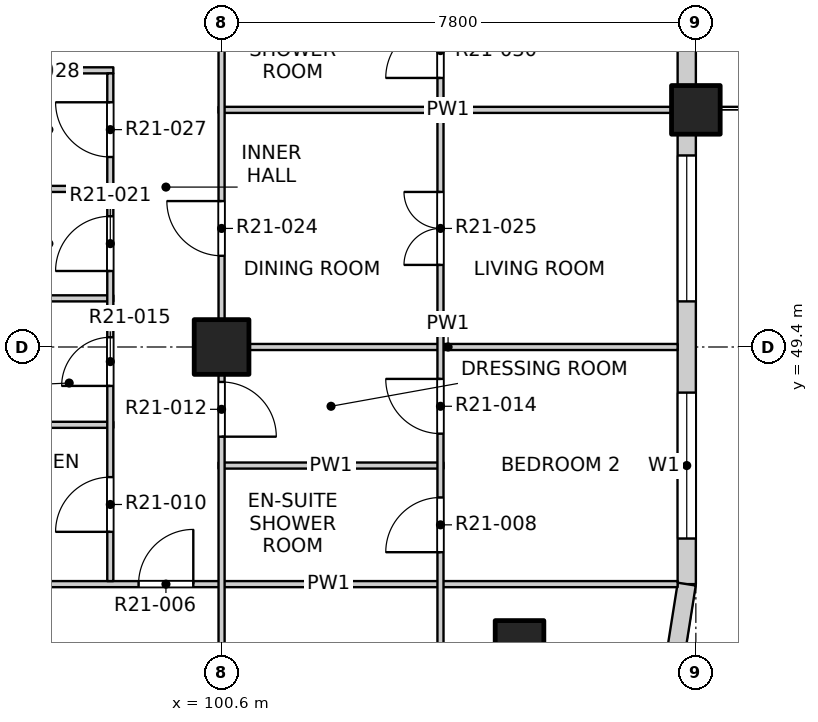
"""IFC4 building model, lengths in metres.
Left out: names, types, materials, properties, quantities, classifications, styles, units other than length and angle.
Written with IfcOpenShell. Run it as: python <this file> out.ifc"""

import sys

from ifc_helpers import new_model, si_unit, direction, frame, frame_2d, origin, origin_2d, place, context, subcontext, project, spatial, rectangle, extrude, element, fill, save


model = new_model("IFC4")
c1 = context("Model", 3, precision=1e-05, world=origin(), true_north=direction((0.0, 1.0)))
c2 = subcontext(c1, "Body", "Model", "MODEL_VIEW")
j1 = project(units=[si_unit("LENGTHUNIT", "METRE"), si_unit("PLANEANGLEUNIT", "RADIAN")], contexts=[c1])
p1 = place(None, origin())
s1 = spatial("IfcSite", under=j1, at=p1, CompositionType="ELEMENT")
p2 = place(p1, origin())
s2 = spatial("IfcBuilding", under=s1, at=p2, CompositionType="ELEMENT")
p3 = place(p2, frame((0.0, 0.0, 214.3)))
s3 = spatial("IfcBuildingStorey", under=s2, at=p3, CompositionType="ELEMENT", Elevation=214.3)
for number, where, z_axis, x_axis in (
    (1, (105.5, 44.5, -0.25), (0.0, 0.0, 1.0), (1.0, 0.0, 0.0)),
    (2, (108.4, 53.3, -0.25), (0.0, 0.0, 1.0), (1.0, 0.0, 0.0)),
):
    element("IfcColumn", number, at=place(p3, frame(where, z_axis=z_axis, x_axis=x_axis)), inside=s3, PredefinedType="COLUMN", context=c2, shape_type="SweptSolid", body=[
        extrude(rectangle(XDim=0.8, YDim=0.8, at=origin_2d()), origin(), (0.0, 0.0, 1.0), 3.4),
    ])
p4 = place(p3, frame((100.6, 49.4, -0.25), z_axis=(0.0, 0.0, 1.0), x_axis=(1.0, 0.0, 0.0)))
e3 = element("IfcColumn", 3, at=p4, inside=s3, PredefinedType="COLUMN", context=c2, shape_type="SweptSolid", body=[
    extrude(rectangle(XDim=0.9, YDim=0.9, at=origin_2d()), origin(), (0.0, 0.0, 1.0), 3.4),
])
p5 = place(p3, frame((108.25, 45.5, 0.0), z_axis=(0.0, 0.0, 1.0), x_axis=(0.0, 1.0, 0.0)))
e4 = element("IfcWall", 4, at=p5, inside=s3, PredefinedType="SOLIDWALL", context=c2, shape_type="SweptSolid", body=[
    extrude(rectangle(XDim=7.4, YDim=0.3, at=frame_2d((3.7, 0.0))), origin(), (0.0, 0.0, 1.0), 2.7),
])
p6 = place(p5, frame((0.75, 0.0, 0.9)))
e5 = element("IfcOpeningElement", 5, at=p6, cuts=e4, PredefinedType="OPENING", context=c2, shape_type="SweptSolid", body=[
    extrude(rectangle(XDim=2.4, YDim=1.8, at=frame_2d((1.2, 0.9))), frame((0.0, 0.16, 0.0), z_axis=(0.0, -1.0, 0.0), x_axis=(1.0, 0.0, 0.0)), (0.0, 0.0, 1.0), 0.32),
])
p7 = place(p5, frame((4.65, 0.0, 0.9)))
e6 = element("IfcOpeningElement", 6, at=p7, cuts=e4, PredefinedType="OPENING", context=c2, shape_type="SweptSolid", body=[
    extrude(rectangle(XDim=2.4, YDim=1.8, at=frame_2d((1.2, 0.9))), frame((0.0, 0.16, 0.0), z_axis=(0.0, -1.0, 0.0), x_axis=(1.0, 0.0, 0.0)), (0.0, 0.0, 1.0), 0.32),
])
p8 = place(p3, frame((108.25, 53.7, 0.0), z_axis=(0.0, 0.0, 1.0), x_axis=(0.0, 1.0, 0.0)))
e7 = element("IfcWall", 7, at=p8, inside=s3, PredefinedType="SOLIDWALL", context=c2, shape_type="SweptSolid", body=[
    extrude(rectangle(XDim=7.0, YDim=0.3, at=frame_2d((3.5, 0.0))), origin(), (0.0, 0.0, 1.0), 2.7),
])
p9 = place(p8, frame((0.65, 0.0, 0.0)))
e8 = element("IfcOpeningElement", 8, at=p9, cuts=e7, PredefinedType="OPENING", context=c2, shape_type="SweptSolid", body=[
    extrude(rectangle(XDim=1.8, YDim=2.4, at=frame_2d((0.9, 1.2))), frame((0.0, 0.16, 0.0), z_axis=(0.0, -1.0, 0.0), x_axis=(1.0, 0.0, 0.0)), (0.0, 0.0, 1.0), 0.32),
])
p10 = place(p8, frame((4.25, 0.0, 0.9)))
e9 = element("IfcOpeningElement", 9, at=p10, cuts=e7, PredefinedType="OPENING", context=c2, shape_type="SweptSolid", body=[
    extrude(rectangle(XDim=2.4, YDim=1.8, at=frame_2d((1.2, 0.9))), frame((0.0, 0.16, 0.0), z_axis=(0.0, -1.0, 0.0), x_axis=(1.0, 0.0, 0.0)), (0.0, 0.0, 1.0), 0.32),
])
p11 = place(p3, frame((108.066, 44.341, 0.0), z_axis=(0.0, 0.0, 1.0), x_axis=(0.156496880861, 0.987678452879, 0.0)))
e10 = element("IfcWall", 10, at=p11, inside=s3, PredefinedType="SOLIDWALL", context=c2, shape_type="SweptSolid", body=[
    extrude(rectangle(XDim=1.173, YDim=0.3, at=frame_2d((0.586, 0.0))), origin(), (0.0, 0.0, 1.0), 2.7),
])
p12 = place(p3, frame((96.625, 45.5, 0.0), z_axis=(0.0, 0.0, 1.0), x_axis=(1.0, 0.0, 0.0)))
e11 = element("IfcWall", 11, at=p12, inside=s3, PredefinedType="PARTITIONING", context=c2, shape_type="SweptSolid", body=[
    extrude(rectangle(XDim=11.475, YDim=0.1, at=frame_2d((5.738, 0.0))), origin(), (0.0, 0.0, 1.0), 3.15),
])
p13 = place(p12, frame((2.61, 0.0, 0.0)))
e12 = element("IfcOpeningElement", 12, at=p13, cuts=e11, PredefinedType="OPENING", context=c2, shape_type="SweptSolid", body=[
    extrude(rectangle(XDim=0.9, YDim=2.1, at=frame_2d((0.45, 1.05))), frame((0.0, 0.06, 0.0), z_axis=(0.0, -1.0, 0.0), x_axis=(1.0, 0.0, 0.0)), (0.0, 0.0, 1.0), 0.12),
])
p14 = place(p3, frame((100.55, 47.45, 0.0), z_axis=(0.0, 0.0, 1.0), x_axis=(1.0, 0.0, 0.0)))
e13 = element("IfcWall", 13, at=p14, inside=s3, PredefinedType="PARTITIONING", context=c2, shape_type="SweptSolid", body=[
    extrude(rectangle(XDim=3.7, YDim=0.1, at=frame_2d((1.85, 0.0))), origin(), (0.0, 0.0, 1.0), 3.15),
])
p15 = place(p3, frame((96.625, 48.12, 0.0), z_axis=(0.0, 0.0, 1.0), x_axis=(1.0, 0.0, 0.0)))
e14 = element("IfcWall", 14, at=p15, inside=s3, PredefinedType="PARTITIONING", context=c2, shape_type="SweptSolid", body=[
    extrude(rectangle(XDim=2.195, YDim=0.1, at=frame_2d((1.098, 0.0))), origin(), (0.0, 0.0, 1.0), 3.15),
])
p16 = place(p3, frame((100.55, 49.4, 0.0), z_axis=(0.0, 0.0, 1.0), x_axis=(1.0, 0.0, 0.0)))
e15 = element("IfcWall", 15, at=p16, inside=s3, PredefinedType="PARTITIONING", context=c2, shape_type="SweptSolid", body=[
    extrude(rectangle(XDim=7.55, YDim=0.1, at=frame_2d((3.775, 0.0))), origin(), (0.0, 0.0, 1.0), 3.15),
])
for number, where, z_axis, x_axis in (
    (16, (96.6, 50.2, 0.0), (0.0, 0.0, 1.0), (1.0, 0.0, 0.0)),
    (17, (96.6, 52.0, 0.0), (0.0, 0.0, 1.0), (1.0, 0.0, 0.0)),
):
    element("IfcWall", number, at=place(p3, frame(where, z_axis=z_axis, x_axis=x_axis)), inside=s3, PredefinedType="PARTITIONING", context=c2, shape_type="SweptSolid", body=[
        extrude(rectangle(XDim=2.22, YDim=0.1, at=frame_2d((1.11, 0.0))), origin(), (0.0, 0.0, 1.0), 3.15),
    ])
p17 = place(p3, frame((100.55, 53.3, 0.0), z_axis=(0.0, 0.0, 1.0), x_axis=(1.0, 0.0, 0.0)))
e18 = element("IfcWall", 18, at=p17, inside=s3, PredefinedType="PARTITIONING", context=c2, shape_type="SweptSolid", body=[
    extrude(rectangle(XDim=7.55, YDim=0.1, at=frame_2d((3.775, 0.0))), origin(), (0.0, 0.0, 1.0), 3.15),
])
p18 = place(p3, frame((96.6, 53.95, 0.0), z_axis=(0.0, 0.0, 1.0), x_axis=(1.0, 0.0, 0.0)))
e19 = element("IfcWall", 19, at=p18, inside=s3, PredefinedType="PARTITIONING", context=c2, shape_type="SweptSolid", body=[
    extrude(rectangle(XDim=2.22, YDim=0.1, at=frame_2d((1.11, 0.0))), origin(), (0.0, 0.0, 1.0), 3.15),
])
p19 = place(p3, frame((98.77, 45.55, 0.0), z_axis=(0.0, 0.0, 1.0), x_axis=(0.0, 1.0, 0.0)))
e20 = element("IfcWall", 20, at=p19, inside=s3, PredefinedType="PARTITIONING", context=c2, shape_type="SweptSolid", body=[
    extrude(rectangle(XDim=8.35, YDim=0.1, at=frame_2d((4.175, 0.0))), origin(), (0.0, 0.0, 1.0), 3.15),
])
p20 = place(p19, frame((0.81, 0.0, 0.0)))
e21 = element("IfcOpeningElement", 21, at=p20, cuts=e20, PredefinedType="OPENING", context=c2, shape_type="SweptSolid", body=[
    extrude(rectangle(XDim=0.9, YDim=2.1, at=frame_2d((0.45, 1.05))), frame((0.0, 0.06, 0.0), z_axis=(0.0, -1.0, 0.0), x_axis=(1.0, 0.0, 0.0)), (0.0, 0.0, 1.0), 0.12),
])
p21 = place(p19, frame((3.21, 0.0, 0.0)))
e22 = element("IfcOpeningElement", 22, at=p21, cuts=e20, PredefinedType="OPENING", context=c2, shape_type="SweptSolid", body=[
    extrude(rectangle(XDim=0.8, YDim=2.1, at=frame_2d((0.4, 1.05))), frame((0.0, 0.06, 0.0), z_axis=(0.0, -1.0, 0.0), x_axis=(1.0, 0.0, 0.0)), (0.0, 0.0, 1.0), 0.12),
])
p22 = place(p19, frame((5.1, 0.0, 0.0)))
e23 = element("IfcOpeningElement", 23, at=p22, cuts=e20, PredefinedType="OPENING", context=c2, shape_type="SweptSolid", body=[
    extrude(rectangle(XDim=0.9, YDim=2.1, at=frame_2d((0.45, 1.05))), frame((0.0, 0.06, 0.0), z_axis=(0.0, -1.0, 0.0), x_axis=(1.0, 0.0, 0.0)), (0.0, 0.0, 1.0), 0.12),
])
p23 = place(p19, frame((6.975, 0.0, 0.0)))
e24 = element("IfcOpeningElement", 24, at=p23, cuts=e20, PredefinedType="OPENING", context=c2, shape_type="SweptSolid", body=[
    extrude(rectangle(XDim=0.9, YDim=2.1, at=frame_2d((0.45, 1.05))), frame((0.0, 0.06, 0.0), z_axis=(0.0, -1.0, 0.0), x_axis=(1.0, 0.0, 0.0)), (0.0, 0.0, 1.0), 0.12),
])
p24 = place(p3, frame((100.6, 41.9, 0.0), z_axis=(0.0, 0.0, 1.0), x_axis=(0.0, 1.0, 0.0)))
e25 = element("IfcWall", 25, at=p24, inside=s3, PredefinedType="PARTITIONING", context=c2, shape_type="SweptSolid", body=[
    extrude(rectangle(XDim=46.2, YDim=0.1, at=frame_2d((23.1, 0.0))), origin(), (0.0, 0.0, 1.0), 3.15),
])
p25 = place(p24, frame((1.2, 0.0, 0.0)))
e26 = element("IfcOpeningElement", 26, at=p25, cuts=e25, PredefinedType="OPENING", context=c2, shape_type="SweptSolid", body=[
    extrude(rectangle(XDim=0.9, YDim=2.1, at=frame_2d((0.45, 1.05))), frame((0.0, 0.06, 0.0), z_axis=(0.0, -1.0, 0.0), x_axis=(1.0, 0.0, 0.0)), (0.0, 0.0, 1.0), 0.12),
])
p26 = place(p24, frame((6.025, 0.0, 0.0)))
e27 = element("IfcOpeningElement", 27, at=p26, cuts=e25, PredefinedType="OPENING", context=c2, shape_type="SweptSolid", body=[
    extrude(rectangle(XDim=0.9, YDim=2.1, at=frame_2d((0.45, 1.05))), frame((0.0, 0.06, 0.0), z_axis=(0.0, -1.0, 0.0), x_axis=(1.0, 0.0, 0.0)), (0.0, 0.0, 1.0), 0.12),
])
p27 = place(p24, frame((9.0, 0.0, 0.0)))
e28 = element("IfcOpeningElement", 28, at=p27, cuts=e25, PredefinedType="OPENING", context=c2, shape_type="SweptSolid", body=[
    extrude(rectangle(XDim=0.9, YDim=2.1, at=frame_2d((0.45, 1.05))), frame((0.0, 0.06, 0.0), z_axis=(0.0, -1.0, 0.0), x_axis=(1.0, 0.0, 0.0)), (0.0, 0.0, 1.0), 0.12),
])
p28 = place(p24, frame((13.85, 0.0, 0.0)))
e29 = element("IfcOpeningElement", 29, at=p28, cuts=e25, PredefinedType="OPENING", context=c2, shape_type="SweptSolid", body=[
    extrude(rectangle(XDim=0.9, YDim=2.1, at=frame_2d((0.45, 1.05))), frame((0.0, 0.06, 0.0), z_axis=(0.0, -1.0, 0.0), x_axis=(1.0, 0.0, 0.0)), (0.0, 0.0, 1.0), 0.12),
])
p29 = place(p24, frame((16.8, 0.0, 0.0)))
e30 = element("IfcOpeningElement", 30, at=p29, cuts=e25, PredefinedType="OPENING", context=c2, shape_type="SweptSolid", body=[
    extrude(rectangle(XDim=0.9, YDim=2.1, at=frame_2d((0.45, 1.05))), frame((0.0, 0.06, 0.0), z_axis=(0.0, -1.0, 0.0), x_axis=(1.0, 0.0, 0.0)), (0.0, 0.0, 1.0), 0.12),
])
p30 = place(p24, frame((21.625, 0.0, 0.0)))
e31 = element("IfcOpeningElement", 31, at=p30, cuts=e25, PredefinedType="OPENING", context=c2, shape_type="SweptSolid", body=[
    extrude(rectangle(XDim=0.9, YDim=2.1, at=frame_2d((0.45, 1.05))), frame((0.0, 0.06, 0.0), z_axis=(0.0, -1.0, 0.0), x_axis=(1.0, 0.0, 0.0)), (0.0, 0.0, 1.0), 0.12),
])
p31 = place(p24, frame((24.6, 0.0, 0.0)))
e32 = element("IfcOpeningElement", 32, at=p31, cuts=e25, PredefinedType="OPENING", context=c2, shape_type="SweptSolid", body=[
    extrude(rectangle(XDim=0.9, YDim=2.1, at=frame_2d((0.45, 1.05))), frame((0.0, 0.06, 0.0), z_axis=(0.0, -1.0, 0.0), x_axis=(1.0, 0.0, 0.0)), (0.0, 0.0, 1.0), 0.12),
])
p32 = place(p24, frame((29.425, 0.0, 0.0)))
e33 = element("IfcOpeningElement", 33, at=p32, cuts=e25, PredefinedType="OPENING", context=c2, shape_type="SweptSolid", body=[
    extrude(rectangle(XDim=0.9, YDim=2.1, at=frame_2d((0.45, 1.05))), frame((0.0, 0.06, 0.0), z_axis=(0.0, -1.0, 0.0), x_axis=(1.0, 0.0, 0.0)), (0.0, 0.0, 1.0), 0.12),
])
p33 = place(p24, frame((33.375, 0.0, 0.0)))
e34 = element("IfcOpeningElement", 34, at=p33, cuts=e25, PredefinedType="OPENING", context=c2, shape_type="SweptSolid", body=[
    extrude(rectangle(XDim=0.9, YDim=2.1, at=frame_2d((0.45, 1.05))), frame((0.0, 0.06, 0.0), z_axis=(0.0, -1.0, 0.0), x_axis=(1.0, 0.0, 0.0)), (0.0, 0.0, 1.0), 0.12),
])
p34 = place(p24, frame((36.3, 0.0, 0.0)))
e35 = element("IfcOpeningElement", 35, at=p34, cuts=e25, PredefinedType="OPENING", context=c2, shape_type="SweptSolid", body=[
    extrude(rectangle(XDim=0.9, YDim=2.1, at=frame_2d((0.45, 1.05))), frame((0.0, 0.06, 0.0), z_axis=(0.0, -1.0, 0.0), x_axis=(1.0, 0.0, 0.0)), (0.0, 0.0, 1.0), 0.12),
])
p35 = place(p24, frame((41.175, 0.0, 0.0)))
e36 = element("IfcOpeningElement", 36, at=p35, cuts=e25, PredefinedType="OPENING", context=c2, shape_type="SweptSolid", body=[
    extrude(rectangle(XDim=0.9, YDim=2.1, at=frame_2d((0.45, 1.05))), frame((0.0, 0.06, 0.0), z_axis=(0.0, -1.0, 0.0), x_axis=(1.0, 0.0, 0.0)), (0.0, 0.0, 1.0), 0.12),
])
p36 = place(p24, frame((44.1, 0.0, 0.0)))
e37 = element("IfcOpeningElement", 37, at=p36, cuts=e25, PredefinedType="OPENING", context=c2, shape_type="SweptSolid", body=[
    extrude(rectangle(XDim=0.9, YDim=2.1, at=frame_2d((0.45, 1.05))), frame((0.0, 0.06, 0.0), z_axis=(0.0, -1.0, 0.0), x_axis=(1.0, 0.0, 0.0)), (0.0, 0.0, 1.0), 0.12),
])
p37 = place(p3, frame((104.2, 41.9, 0.0), z_axis=(0.0, 0.0, 1.0), x_axis=(0.0, 1.0, 0.0)))
e38 = element("IfcWall", 38, at=p37, inside=s3, PredefinedType="PARTITIONING", context=c2, shape_type="SweptSolid", body=[
    extrude(rectangle(XDim=23.0, YDim=0.1, at=frame_2d((11.5, 0.0))), origin(), (0.0, 0.0, 1.0), 3.15),
])
p38 = place(p37, frame((1.05, 0.0, 0.0)))
e39 = element("IfcOpeningElement", 39, at=p38, cuts=e38, PredefinedType="OPENING", context=c2, shape_type="SweptSolid", body=[
    extrude(rectangle(XDim=1.2, YDim=2.1, at=frame_2d((0.6, 1.05))), frame((0.0, 0.06, 0.0), z_axis=(0.0, -1.0, 0.0), x_axis=(1.0, 0.0, 0.0)), (0.0, 0.0, 1.0), 0.12),
])
p39 = place(p37, frame((4.125, 0.0, 0.0)))
e40 = element("IfcOpeningElement", 40, at=p39, cuts=e38, PredefinedType="OPENING", context=c2, shape_type="SweptSolid", body=[
    extrude(rectangle(XDim=0.9, YDim=2.1, at=frame_2d((0.45, 1.05))), frame((0.0, 0.06, 0.0), z_axis=(0.0, -1.0, 0.0), x_axis=(1.0, 0.0, 0.0)), (0.0, 0.0, 1.0), 0.12),
])
p40 = place(p37, frame((6.075, 0.0, 0.0)))
e41 = element("IfcOpeningElement", 41, at=p40, cuts=e38, PredefinedType="OPENING", context=c2, shape_type="SweptSolid", body=[
    extrude(rectangle(XDim=0.9, YDim=2.1, at=frame_2d((0.45, 1.05))), frame((0.0, 0.06, 0.0), z_axis=(0.0, -1.0, 0.0), x_axis=(1.0, 0.0, 0.0)), (0.0, 0.0, 1.0), 0.12),
])
p41 = place(p37, frame((8.85, 0.0, 0.0)))
e42 = element("IfcOpeningElement", 42, at=p41, cuts=e38, PredefinedType="OPENING", context=c2, shape_type="SweptSolid", body=[
    extrude(rectangle(XDim=1.2, YDim=2.1, at=frame_2d((0.6, 1.05))), frame((0.0, 0.06, 0.0), z_axis=(0.0, -1.0, 0.0), x_axis=(1.0, 0.0, 0.0)), (0.0, 0.0, 1.0), 0.12),
])
p42 = place(p37, frame((11.925, 0.0, 0.0)))
e43 = element("IfcOpeningElement", 43, at=p42, cuts=e38, PredefinedType="OPENING", context=c2, shape_type="SweptSolid", body=[
    extrude(rectangle(XDim=0.9, YDim=2.1, at=frame_2d((0.45, 1.05))), frame((0.0, 0.06, 0.0), z_axis=(0.0, -1.0, 0.0), x_axis=(1.0, 0.0, 0.0)), (0.0, 0.0, 1.0), 0.12),
])
p43 = place(p37, frame((13.875, 0.0, 0.0)))
e44 = element("IfcOpeningElement", 44, at=p43, cuts=e38, PredefinedType="OPENING", context=c2, shape_type="SweptSolid", body=[
    extrude(rectangle(XDim=0.9, YDim=2.1, at=frame_2d((0.45, 1.05))), frame((0.0, 0.06, 0.0), z_axis=(0.0, -1.0, 0.0), x_axis=(1.0, 0.0, 0.0)), (0.0, 0.0, 1.0), 0.12),
])
p44 = place(p37, frame((16.65, 0.0, 0.0)))
e45 = element("IfcOpeningElement", 45, at=p44, cuts=e38, PredefinedType="OPENING", context=c2, shape_type="SweptSolid", body=[
    extrude(rectangle(XDim=1.2, YDim=2.1, at=frame_2d((0.6, 1.05))), frame((0.0, 0.06, 0.0), z_axis=(0.0, -1.0, 0.0), x_axis=(1.0, 0.0, 0.0)), (0.0, 0.0, 1.0), 0.12),
])
p45 = place(p37, frame((19.725, 0.0, 0.0)))
e46 = element("IfcOpeningElement", 46, at=p45, cuts=e38, PredefinedType="OPENING", context=c2, shape_type="SweptSolid", body=[
    extrude(rectangle(XDim=0.9, YDim=2.1, at=frame_2d((0.45, 1.05))), frame((0.0, 0.06, 0.0), z_axis=(0.0, -1.0, 0.0), x_axis=(1.0, 0.0, 0.0)), (0.0, 0.0, 1.0), 0.12),
])
p46 = place(p37, frame((21.675, 0.0, 0.0)))
e47 = element("IfcOpeningElement", 47, at=p46, cuts=e38, PredefinedType="OPENING", context=c2, shape_type="SweptSolid", body=[
    extrude(rectangle(XDim=0.9, YDim=2.1, at=frame_2d((0.45, 1.05))), frame((0.0, 0.06, 0.0), z_axis=(0.0, -1.0, 0.0), x_axis=(1.0, 0.0, 0.0)), (0.0, 0.0, 1.0), 0.12),
])
p47 = place(p6, origin())
e48 = element("IfcWindow", 48, at=p47, inside=s3, PartitioningType="DOUBLE_PANEL_VERTICAL", PredefinedType="WINDOW", context=c2, shape_type="SweptSolid", body=[
    extrude(rectangle(XDim=2.4, YDim=1.8, at=frame_2d((1.2, 0.9))), frame((0.0, 0.03, 0.0), z_axis=(0.0, -1.0, 0.0), x_axis=(1.0, 0.0, 0.0)), (0.0, 0.0, 1.0), 0.06),
])
fill(e5, e48)
p48 = place(p7, origin())
e49 = element("IfcWindow", 49, at=p48, inside=s3, PartitioningType="DOUBLE_PANEL_VERTICAL", PredefinedType="WINDOW", context=c2, shape_type="SweptSolid", body=[
    extrude(rectangle(XDim=2.4, YDim=1.8, at=frame_2d((1.2, 0.9))), frame((0.0, 0.03, 0.0), z_axis=(0.0, -1.0, 0.0), x_axis=(1.0, 0.0, 0.0)), (0.0, 0.0, 1.0), 0.06),
])
fill(e6, e49)
p49 = place(p13, origin())
e50 = element("IfcDoor", 50, at=p49, inside=s3, OperationType="SINGLE_SWING_RIGHT", PredefinedType="DOOR", context=c2, shape_type="SweptSolid", body=[
    extrude(rectangle(XDim=0.9, YDim=2.1, at=frame_2d((0.45, 1.05))), frame((0.0, 0.025, 0.0), z_axis=(0.0, -1.0, 0.0), x_axis=(1.0, 0.0, 0.0)), (0.0, 0.0, 1.0), 0.05),
])
fill(e12, e50)
p50 = place(p39, origin())
e51 = element("IfcDoor", 51, at=p50, inside=s3, OperationType="SINGLE_SWING_LEFT", PredefinedType="DOOR", context=c2, shape_type="SweptSolid", body=[
    extrude(rectangle(XDim=0.9, YDim=2.1, at=frame_2d((0.45, 1.05))), frame((0.0, 0.025, 0.0), z_axis=(0.0, -1.0, 0.0), x_axis=(1.0, 0.0, 0.0)), (0.0, 0.0, 1.0), 0.05),
])
fill(e40, e51)
p51 = place(p20, origin())
e52 = element("IfcDoor", 52, at=p51, inside=s3, OperationType="SINGLE_SWING_LEFT", PredefinedType="DOOR", context=c2, shape_type="SweptSolid", body=[
    extrude(rectangle(XDim=0.9, YDim=2.1, at=frame_2d((0.45, 1.05))), frame((0.0, 0.025, 0.0), z_axis=(0.0, -1.0, 0.0), x_axis=(1.0, 0.0, 0.0)), (0.0, 0.0, 1.0), 0.05),
])
fill(e21, e52)
p52 = place(p26, origin())
e53 = element("IfcDoor", 53, at=p52, inside=s3, OperationType="SINGLE_SWING_RIGHT", PredefinedType="DOOR", context=c2, shape_type="SweptSolid", body=[
    extrude(rectangle(XDim=0.9, YDim=2.1, at=frame_2d((0.45, 1.05))), frame((0.0, 0.025, 0.0), z_axis=(0.0, -1.0, 0.0), x_axis=(1.0, 0.0, 0.0)), (0.0, 0.0, 1.0), 0.05),
])
fill(e27, e53)
p53 = place(p40, origin())
e54 = element("IfcDoor", 54, at=p53, inside=s3, OperationType="SINGLE_SWING_RIGHT", PredefinedType="DOOR", context=c2, shape_type="SweptSolid", body=[
    extrude(rectangle(XDim=0.9, YDim=2.1, at=frame_2d((0.45, 1.05))), frame((0.0, 0.025, 0.0), z_axis=(0.0, -1.0, 0.0), x_axis=(1.0, 0.0, 0.0)), (0.0, 0.0, 1.0), 0.05),
])
fill(e41, e54)
p54 = place(p21, origin())
e55 = element("IfcDoor", 55, at=p54, inside=s3, OperationType="SINGLE_SWING_LEFT", PredefinedType="DOOR", context=c2, shape_type="SweptSolid", body=[
    extrude(rectangle(XDim=0.8, YDim=2.1, at=frame_2d((0.4, 1.05))), frame((0.0, 0.025, 0.0), z_axis=(0.0, -1.0, 0.0), x_axis=(1.0, 0.0, 0.0)), (0.0, 0.0, 1.0), 0.05),
])
fill(e22, e55)
p55 = place(p22, origin())
e56 = element("IfcDoor", 56, at=p55, inside=s3, OperationType="SINGLE_SWING_LEFT", PredefinedType="DOOR", context=c2, shape_type="SweptSolid", body=[
    extrude(rectangle(XDim=0.9, YDim=2.1, at=frame_2d((0.45, 1.05))), frame((0.0, 0.025, 0.0), z_axis=(0.0, -1.0, 0.0), x_axis=(1.0, 0.0, 0.0)), (0.0, 0.0, 1.0), 0.05),
])
fill(e23, e56)
p56 = place(p27, origin())
e57 = element("IfcDoor", 57, at=p56, inside=s3, OperationType="SINGLE_SWING_RIGHT", PredefinedType="DOOR", context=c2, shape_type="SweptSolid", body=[
    extrude(rectangle(XDim=0.9, YDim=2.1, at=frame_2d((0.45, 1.05))), frame((0.0, 0.025, 0.0), z_axis=(0.0, -1.0, 0.0), x_axis=(1.0, 0.0, 0.0)), (0.0, 0.0, 1.0), 0.05),
])
fill(e28, e57)
p57 = place(p41, origin())
e58 = element("IfcDoor", 58, at=p57, inside=s3, OperationType="DOUBLE_DOOR_SINGLE_SWING", PredefinedType="DOOR", context=c2, shape_type="SweptSolid", body=[
    extrude(rectangle(XDim=1.2, YDim=2.1, at=frame_2d((0.6, 1.05))), frame((0.0, 0.025, 0.0), z_axis=(0.0, -1.0, 0.0), x_axis=(1.0, 0.0, 0.0)), (0.0, 0.0, 1.0), 0.05),
])
fill(e42, e58)
p58 = place(p23, origin())
e59 = element("IfcDoor", 59, at=p58, inside=s3, OperationType="SINGLE_SWING_RIGHT", PredefinedType="DOOR", context=c2, shape_type="SweptSolid", body=[
    extrude(rectangle(XDim=0.9, YDim=2.1, at=frame_2d((0.45, 1.05))), frame((0.0, 0.025, 0.0), z_axis=(0.0, -1.0, 0.0), x_axis=(1.0, 0.0, 0.0)), (0.0, 0.0, 1.0), 0.05),
])
fill(e24, e59)
p59 = place(p42, origin())
e60 = element("IfcDoor", 60, at=p59, inside=s3, OperationType="SINGLE_SWING_LEFT", PredefinedType="DOOR", context=c2, shape_type="SweptSolid", body=[
    extrude(rectangle(XDim=0.9, YDim=2.1, at=frame_2d((0.45, 1.05))), frame((0.0, 0.025, 0.0), z_axis=(0.0, -1.0, 0.0), x_axis=(1.0, 0.0, 0.0)), (0.0, 0.0, 1.0), 0.05),
])
fill(e43, e60)
save(model, sys.argv[1])
